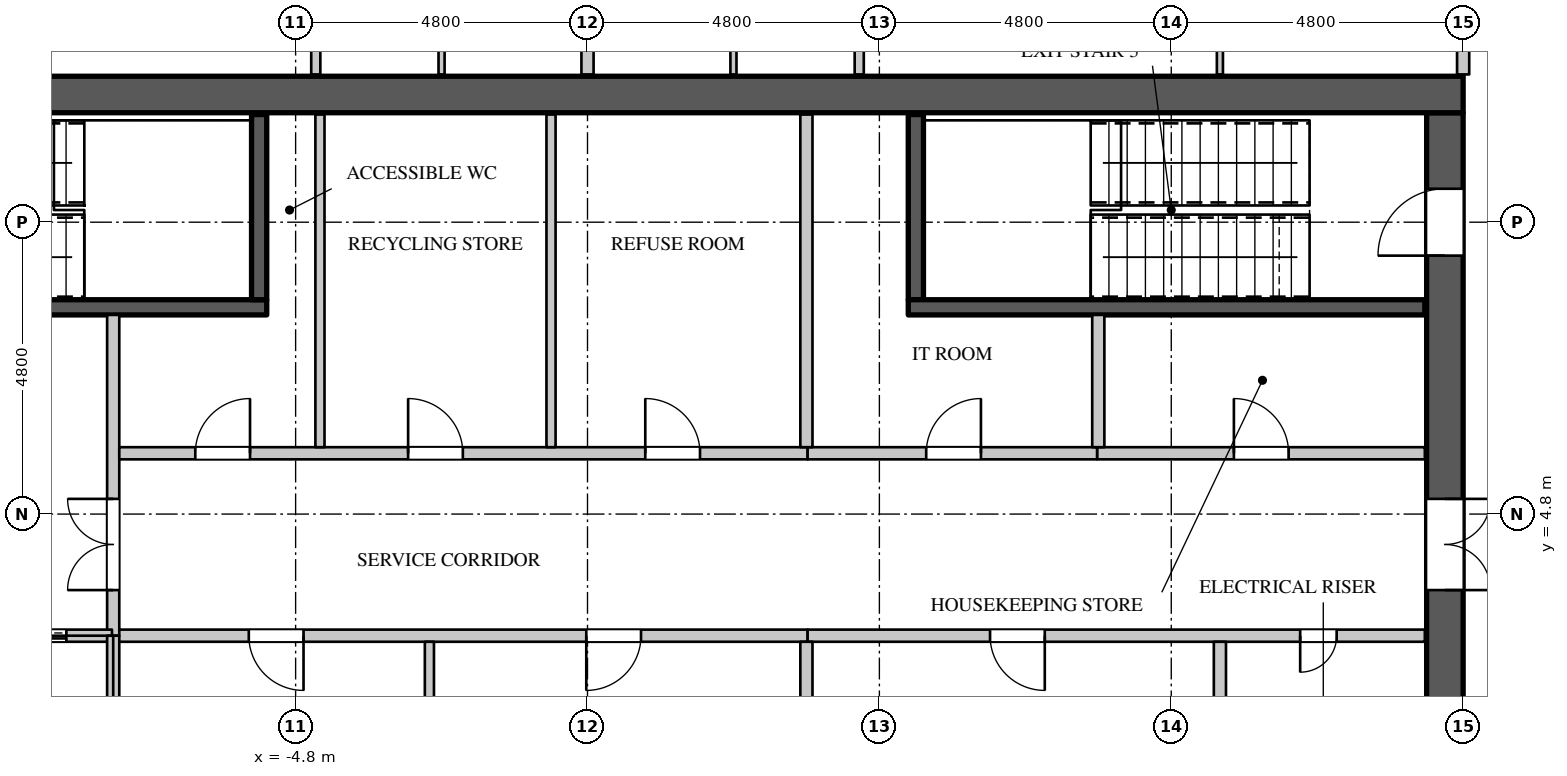
"""IFC4 building model, lengths in metres.
Left out: names, types, materials, properties, quantities, classifications, styles, units other than length and angle.
Written with IfcOpenShell. Run it as: python <this file> out.ifc"""

import sys

from ifc_helpers import new_model, si_unit, direction, frame, frame_2d, origin, place, context, subcontext, project, spatial, rectangle, extrude, element, fill, save


model = new_model("IFC4")
c1 = context("Model", 3, precision=1e-05, world=origin(), true_north=direction((0.0, 1.0)))
c2 = subcontext(c1, "Body", "Model", "MODEL_VIEW")
j1 = project(units=[si_unit("LENGTHUNIT", "METRE"), si_unit("PLANEANGLEUNIT", "RADIAN")], contexts=[c1])
p1 = place(None, origin())
s1 = spatial("IfcSite", under=j1, at=p1, CompositionType="ELEMENT")
p2 = place(p1, origin())
s2 = spatial("IfcBuilding", under=s1, at=p2, CompositionType="ELEMENT")
p3 = place(p2, frame((0.0, 0.0, 247.5)))
s3 = spatial("IfcBuildingStorey", under=s2, at=p3, CompositionType="ELEMENT", Elevation=247.5)
p4 = place(p3, frame((-14.4, 11.7, 0.0), z_axis=(0.0, 0.0, 1.0), x_axis=(1.0, 0.0, 0.0)))
e1 = element("IfcWall", 1, at=p4, inside=s3, PredefinedType="SHEAR", context=c2, shape_type="SweptSolid", body=[
    extrude(rectangle(XDim=28.8, YDim=0.6, at=frame_2d((14.4, 0.0))), origin(), (0.0, 0.0, 1.0), 4.2),
])
p5 = place(p3, frame((14.1, -11.4, 0.0), z_axis=(0.0, 0.0, 1.0), x_axis=(0.0, 1.0, 0.0)))
e2 = element("IfcWall", 2, at=p5, inside=s3, PredefinedType="SHEAR", context=c2, shape_type="SweptSolid", body=[
    extrude(rectangle(XDim=22.8, YDim=0.6, at=frame_2d((11.4, 0.0))), origin(), (0.0, 0.0, 1.0), 4.2),
])
p6 = place(p5, frame((20.45, 0.0, 0.0)))
e3 = element("IfcOpeningElement", 3, at=p6, cuts=e2, PredefinedType="OPENING", context=c2, shape_type="SweptSolid", body=[
    extrude(rectangle(XDim=1.1, YDim=2.2, at=frame_2d((0.55, 1.1))), frame((0.0, 0.31, 0.0), z_axis=(0.0, -1.0, 0.0), x_axis=(1.0, 0.0, 0.0)), (0.0, 0.0, 1.0), 0.62),
])
p7 = place(p5, frame((1.25, 0.0, 0.0)))
e4 = element("IfcOpeningElement", 4, at=p7, cuts=e2, PredefinedType="OPENING", context=c2, shape_type="SweptSolid", body=[
    extrude(rectangle(XDim=1.1, YDim=2.2, at=frame_2d((0.55, 1.1))), frame((0.0, 0.31, 0.0), z_axis=(0.0, -1.0, 0.0), x_axis=(1.0, 0.0, 0.0)), (0.0, 0.0, 1.0), 0.62),
])
p8 = place(p5, frame((14.95, 0.0, 0.0)))
e5 = element("IfcOpeningElement", 5, at=p8, cuts=e2, PredefinedType="OPENING", context=c2, shape_type="SweptSolid", body=[
    extrude(rectangle(XDim=1.5, YDim=2.4, at=frame_2d((0.75, 1.2))), frame((0.0, 0.31, 0.0), z_axis=(0.0, -1.0, 0.0), x_axis=(1.0, 0.0, 0.0)), (0.0, 0.0, 1.0), 0.62),
])
p9 = place(p5, frame((6.35, 0.0, 0.0)))
e6 = element("IfcOpeningElement", 6, at=p9, cuts=e2, PredefinedType="OPENING", context=c2, shape_type="SweptSolid", body=[
    extrude(rectangle(XDim=1.5, YDim=2.4, at=frame_2d((0.75, 1.2))), frame((0.0, 0.31, 0.0), z_axis=(0.0, -1.0, 0.0), x_axis=(1.0, 0.0, 0.0)), (0.0, 0.0, 1.0), 0.62),
])
p10 = place(p3, frame((-7.82, 2.8, 0.0), z_axis=(0.0, 0.0, 1.0), x_axis=(1.0, 0.0, 0.0)))
e7 = element("IfcWall", 7, at=p10, inside=s3, PredefinedType="PARTITIONING", context=c2, shape_type="SweptSolid", body=[
    extrude(rectangle(XDim=11.44, YDim=0.2, at=frame_2d((5.72, 0.0))), origin(), (0.0, 0.0, 1.0), 3.95),
])
p11 = place(p10, frame((2.25, 0.0, 0.0)))
e8 = element("IfcOpeningElement", 8, at=p11, cuts=e7, PredefinedType="OPENING", context=c2, shape_type="SweptSolid", body=[
    extrude(rectangle(XDim=0.9, YDim=2.2, at=frame_2d((0.45, 1.1))), frame((0.0, 0.11, 0.0), z_axis=(0.0, -1.0, 0.0), x_axis=(1.0, 0.0, 0.0)), (0.0, 0.0, 1.0), 0.22),
])
p12 = place(p10, frame((7.8, 0.0, 0.0)))
e9 = element("IfcOpeningElement", 9, at=p12, cuts=e7, PredefinedType="OPENING", context=c2, shape_type="SweptSolid", body=[
    extrude(rectangle(XDim=0.9, YDim=2.2, at=frame_2d((0.45, 1.1))), frame((0.0, 0.11, 0.0), z_axis=(0.0, -1.0, 0.0), x_axis=(1.0, 0.0, 0.0)), (0.0, 0.0, 1.0), 0.22),
])
p13 = place(p3, frame((-7.8, 2.8, 0.0), z_axis=(0.0, 0.0, 1.0), x_axis=(0.0, 1.0, 0.0)))
e10 = element("IfcWall", 10, at=p13, inside=s3, PredefinedType="PARTITIONING", context=c2, shape_type="SweptSolid", body=[
    extrude(rectangle(XDim=5.275, YDim=0.2, at=frame_2d((2.637, 0.0))), origin(), (0.0, 0.0, 1.0), 3.95),
])
p14 = place(p13, frame((0.75, 0.0, 0.0)))
e11 = element("IfcOpeningElement", 11, at=p14, cuts=e10, PredefinedType="OPENING", context=c2, shape_type="SweptSolid", body=[
    extrude(rectangle(XDim=1.5, YDim=2.4, at=frame_2d((0.75, 1.2))), frame((0.0, 0.11, 0.0), z_axis=(0.0, -1.0, 0.0), x_axis=(1.0, 0.0, 0.0)), (0.0, 0.0, 1.0), 0.22),
])
p15 = place(p3, frame((-7.7, 5.8, 0.0), z_axis=(0.0, 0.0, 1.0), x_axis=(1.0, 0.0, 0.0)))
e12 = element("IfcWall", 12, at=p15, inside=s3, PredefinedType="PARTITIONING", context=c2, shape_type="SweptSolid", body=[
    extrude(rectangle(XDim=11.32, YDim=0.2, at=frame_2d((5.66, 0.0))), origin(), (0.0, 0.0, 1.0), 3.95),
])
p16 = place(p15, frame((1.25, 0.0, 0.0)))
e13 = element("IfcOpeningElement", 13, at=p16, cuts=e12, PredefinedType="OPENING", context=c2, shape_type="SweptSolid", body=[
    extrude(rectangle(XDim=0.9, YDim=2.2, at=frame_2d((0.45, 1.1))), frame((0.0, 0.11, 0.0), z_axis=(0.0, -1.0, 0.0), x_axis=(1.0, 0.0, 0.0)), (0.0, 0.0, 1.0), 0.22),
])
p17 = place(p15, frame((4.75, 0.0, 0.0)))
e14 = element("IfcOpeningElement", 14, at=p17, cuts=e12, PredefinedType="OPENING", context=c2, shape_type="SweptSolid", body=[
    extrude(rectangle(XDim=0.9, YDim=2.2, at=frame_2d((0.45, 1.1))), frame((0.0, 0.11, 0.0), z_axis=(0.0, -1.0, 0.0), x_axis=(1.0, 0.0, 0.0)), (0.0, 0.0, 1.0), 0.22),
])
p18 = place(p15, frame((8.65, 0.0, 0.0)))
e15 = element("IfcOpeningElement", 15, at=p18, cuts=e12, PredefinedType="OPENING", context=c2, shape_type="SweptSolid", body=[
    extrude(rectangle(XDim=0.9, YDim=2.2, at=frame_2d((0.45, 1.1))), frame((0.0, 0.11, 0.0), z_axis=(0.0, -1.0, 0.0), x_axis=(1.0, 0.0, 0.0)), (0.0, 0.0, 1.0), 0.22),
])
p19 = place(p3, frame((8.38, 5.8, 0.0), z_axis=(0.0, 0.0, 1.0), x_axis=(1.0, 0.0, 0.0)))
e16 = element("IfcWall", 16, at=p19, inside=s3, PredefinedType="PARTITIONING", context=c2, shape_type="SweptSolid", body=[
    extrude(rectangle(XDim=5.39, YDim=0.2, at=frame_2d((2.695, 0.0))), origin(), (0.0, 0.0, 1.0), 3.95),
])
p20 = place(p19, frame((2.25, 0.0, 0.0)))
e17 = element("IfcOpeningElement", 17, at=p20, cuts=e16, PredefinedType="OPENING", context=c2, shape_type="SweptSolid", body=[
    extrude(rectangle(XDim=0.9, YDim=2.2, at=frame_2d((0.45, 1.1))), frame((0.0, 0.11, 0.0), z_axis=(0.0, -1.0, 0.0), x_axis=(1.0, 0.0, 0.0)), (0.0, 0.0, 1.0), 0.22),
])
p21 = place(p3, frame((14.4, 12.03, 0.0), z_axis=(0.0, 0.0, 1.0), x_axis=(0.0, 1.0, 0.0)))
e18 = element("IfcWall", 18, at=p21, inside=s3, PredefinedType="PARTITIONING", context=c2, shape_type="SweptSolid", body=[
    extrude(rectangle(XDim=2.27, YDim=0.2, at=frame_2d((1.135, 0.0))), origin(), (0.0, 0.0, 1.0), 3.95),
])
p22 = place(p3, frame((-4.469, 12.03, 0.0), z_axis=(0.0, 0.0, 1.0), x_axis=(0.0, 1.0, 0.0)))
e19 = element("IfcWall", 19, at=p22, inside=s3, PredefinedType="PARTITIONING", context=c2, shape_type="SweptSolid", body=[
    extrude(rectangle(XDim=13.92, YDim=0.15, at=frame_2d((6.96, 0.0))), origin(), (0.0, 0.0, 1.0), 3.3),
])
p23 = place(p22, frame((9.1, 0.0, 0.0)))
e20 = element("IfcOpeningElement", 20, at=p23, cuts=e19, PredefinedType="OPENING", context=c2, shape_type="SweptSolid", body=[
    extrude(rectangle(XDim=0.95, YDim=2.2, at=frame_2d((0.475, 1.1))), frame((0.0, 0.085, 0.0), z_axis=(0.0, -1.0, 0.0), x_axis=(1.0, 0.0, 0.0)), (0.0, 0.0, 1.0), 0.17),
])
p24 = place(p3, frame((-4.4, 5.9, 0.0), z_axis=(0.0, 0.0, 1.0), x_axis=(0.0, 1.0, 0.0)))
e21 = element("IfcWall", 21, at=p24, inside=s3, PredefinedType="PARTITIONING", context=c2, shape_type="SweptSolid", body=[
    extrude(rectangle(XDim=5.47, YDim=0.15, at=frame_2d((2.735, 0.0))), origin(), (0.0, 0.0, 1.0), 3.95),
])
p25 = place(p3, frame((-2.6, 0.0, 0.0), z_axis=(0.0, 0.0, 1.0), x_axis=(0.0, 1.0, 0.0)))
e22 = element("IfcWall", 22, at=p25, inside=s3, PredefinedType="PARTITIONING", context=c2, shape_type="SweptSolid", body=[
    extrude(rectangle(XDim=2.7, YDim=0.15, at=frame_2d((1.35, 0.0))), origin(), (0.0, 0.0, 1.0), 3.95),
])
p26 = place(p3, frame((-0.6, 5.9, 0.0), z_axis=(0.0, 0.0, 1.0), x_axis=(0.0, 1.0, 0.0)))
e23 = element("IfcWall", 23, at=p26, inside=s3, PredefinedType="PARTITIONING", context=c2, shape_type="SweptSolid", body=[
    extrude(rectangle(XDim=5.47, YDim=0.15, at=frame_2d((2.735, 0.0))), origin(), (0.0, 0.0, 1.0), 3.95),
])
p27 = place(p3, frame((4.469, 12.03, 0.0), z_axis=(0.0, 0.0, 1.0), x_axis=(0.0, 1.0, 0.0)))
e24 = element("IfcWall", 24, at=p27, inside=s3, PredefinedType="PARTITIONING", context=c2, shape_type="SweptSolid", body=[
    extrude(rectangle(XDim=13.92, YDim=0.15, at=frame_2d((6.96, 0.0))), origin(), (0.0, 0.0, 1.0), 3.3),
])
p28 = place(p27, frame((9.35, 0.0, 0.0)))
e25 = element("IfcOpeningElement", 25, at=p28, cuts=e24, PredefinedType="OPENING", context=c2, shape_type="SweptSolid", body=[
    extrude(rectangle(XDim=0.95, YDim=2.2, at=frame_2d((0.475, 1.1))), frame((0.0, 0.085, 0.0), z_axis=(0.0, -1.0, 0.0), x_axis=(1.0, 0.0, 0.0)), (0.0, 0.0, 1.0), 0.17),
])
p29 = place(p3, frame((0.0, 12.03, 0.0), z_axis=(0.0, 0.0, 1.0), x_axis=(0.0, 1.0, 0.0)))
e26 = element("IfcWall", 26, at=p29, inside=s3, PredefinedType="PARTITIONING", context=c2, shape_type="SweptSolid", body=[
    extrude(rectangle(XDim=14.425, YDim=0.2, at=frame_2d((7.212, 0.0))), origin(), (0.0, 0.0, 1.0), 3.95),
])
p30 = place(p3, frame((3.62, 2.8, 0.0), z_axis=(0.0, 0.0, 1.0), x_axis=(1.0, 0.0, 0.0)))
e27 = element("IfcWall", 27, at=p30, inside=s3, PredefinedType="PARTITIONING", context=c2, shape_type="SweptSolid", body=[
    extrude(rectangle(XDim=10.15, YDim=0.2, at=frame_2d((5.075, 0.0))), origin(), (0.0, 0.0, 1.0), 3.95),
])
p31 = place(p30, frame((8.1, 0.0, 0.0)))
e28 = element("IfcOpeningElement", 28, at=p31, cuts=e27, PredefinedType="OPENING", context=c2, shape_type="SweptSolid", body=[
    extrude(rectangle(XDim=0.6, YDim=2.0, at=frame_2d((0.3, 1.0))), frame((0.0, 0.11, 0.0), z_axis=(0.0, -1.0, 0.0), x_axis=(1.0, 0.0, 0.0)), (0.0, 0.0, 1.0), 0.22),
])
p32 = place(p30, frame((3.0, 0.0, 0.0)))
e29 = element("IfcOpeningElement", 29, at=p32, cuts=e27, PredefinedType="OPENING", context=c2, shape_type="SweptSolid", body=[
    extrude(rectangle(XDim=0.9, YDim=2.2, at=frame_2d((0.45, 1.1))), frame((0.0, 0.11, 0.0), z_axis=(0.0, -1.0, 0.0), x_axis=(1.0, 0.0, 0.0)), (0.0, 0.0, 1.0), 0.22),
])
p33 = place(p3, frame((3.62, 5.8, 0.0), z_axis=(0.0, 0.0, 1.0), x_axis=(1.0, 0.0, 0.0)))
e30 = element("IfcWall", 30, at=p33, inside=s3, PredefinedType="PARTITIONING", context=c2, shape_type="SweptSolid", body=[
    extrude(rectangle(XDim=4.76, YDim=0.2, at=frame_2d((2.38, 0.0))), origin(), (0.0, 0.0, 1.0), 3.95),
])
p34 = place(p33, frame((1.95, 0.0, 0.0)))
e31 = element("IfcOpeningElement", 31, at=p34, cuts=e30, PredefinedType="OPENING", context=c2, shape_type="SweptSolid", body=[
    extrude(rectangle(XDim=0.9, YDim=2.2, at=frame_2d((0.45, 1.1))), frame((0.0, 0.11, 0.0), z_axis=(0.0, -1.0, 0.0), x_axis=(1.0, 0.0, 0.0)), (0.0, 0.0, 1.0), 0.22),
])
p35 = place(p3, frame((3.6, 0.1, 0.0), z_axis=(0.0, 0.0, 1.0), x_axis=(0.0, 1.0, 0.0)))
e32 = element("IfcWall", 32, at=p35, inside=s3, PredefinedType="PARTITIONING", context=c2, shape_type="SweptSolid", body=[
    extrude(rectangle(XDim=2.6, YDim=0.2, at=frame_2d((1.3, 0.0))), origin(), (0.0, 0.0, 1.0), 3.95),
])
p36 = place(p3, frame((3.6, 5.9, 0.0), z_axis=(0.0, 0.0, 1.0), x_axis=(0.0, 1.0, 0.0)))
e33 = element("IfcWall", 33, at=p36, inside=s3, PredefinedType="PARTITIONING", context=c2, shape_type="SweptSolid", body=[
    extrude(rectangle(XDim=5.47, YDim=0.2, at=frame_2d((2.735, 0.0))), origin(), (0.0, 0.0, 1.0), 3.95),
])
p37 = place(p3, frame((8.4, 5.9, 0.0), z_axis=(0.0, 0.0, 1.0), x_axis=(0.0, 1.0, 0.0)))
e34 = element("IfcWall", 34, at=p37, inside=s3, PredefinedType="PARTITIONING", context=c2, shape_type="SweptSolid", body=[
    extrude(rectangle(XDim=2.175, YDim=0.2, at=frame_2d((1.087, 0.0))), origin(), (0.0, 0.0, 1.0), 3.95),
])
p38 = place(p3, frame((10.4, 0.1, 0.0), z_axis=(0.0, 0.0, 1.0), x_axis=(0.0, 1.0, 0.0)))
e35 = element("IfcWall", 35, at=p38, inside=s3, PredefinedType="PARTITIONING", context=c2, shape_type="SweptSolid", body=[
    extrude(rectangle(XDim=2.6, YDim=0.2, at=frame_2d((1.3, 0.0))), origin(), (0.0, 0.0, 1.0), 3.95),
])
p39 = place(p3, frame((-13.77, 2.8, 0.0), z_axis=(0.0, 0.0, 1.0), x_axis=(1.0, 0.0, 0.0)))
e36 = element("IfcWall", 36, at=p39, inside=s3, PredefinedType="PARTITIONING", context=c2, shape_type="SweptSolid", body=[
    extrude(rectangle(XDim=5.95, YDim=0.2, at=frame_2d((2.975, 0.0))), origin(), (0.0, 0.0, 1.0), 3.95),
])
p40 = place(p39, frame((1.1, 0.0, 0.0)))
e37 = element("IfcOpeningElement", 37, at=p40, cuts=e36, PredefinedType="OPENING", context=c2, shape_type="SweptSolid", body=[
    extrude(rectangle(XDim=1.1, YDim=2.2, at=frame_2d((0.55, 1.1))), frame((0.0, 0.11, 0.0), z_axis=(0.0, -1.0, 0.0), x_axis=(1.0, 0.0, 0.0)), (0.0, 0.0, 1.0), 0.22),
])
p41 = place(p39, frame((4.1, 0.0, 0.0)))
e38 = element("IfcOpeningElement", 38, at=p41, cuts=e36, PredefinedType="OPENING", context=c2, shape_type="SweptSolid", body=[
    extrude(rectangle(XDim=1.1, YDim=2.2, at=frame_2d((0.55, 1.1))), frame((0.0, 0.11, 0.0), z_axis=(0.0, -1.0, 0.0), x_axis=(1.0, 0.0, 0.0)), (0.0, 0.0, 1.0), 0.22),
])
p42 = place(p3, frame((-7.8, 0.0, 0.0), z_axis=(0.0, 0.0, 1.0), x_axis=(0.0, 1.0, 0.0)))
e39 = element("IfcWall", 39, at=p42, inside=s3, PredefinedType="PARTITIONING", context=c2, shape_type="SweptSolid", body=[
    extrude(rectangle(XDim=2.8, YDim=0.2, at=frame_2d((1.4, 0.0))), origin(), (0.0, 0.0, 1.0), 3.95),
])
p43 = place(p3, frame((-13.77, 8.2, 0.0), z_axis=(0.0, 0.0, 1.0), x_axis=(1.0, 0.0, 0.0)))
e40 = element("IfcWall", 40, at=p43, inside=s3, PredefinedType="SHEAR", context=c2, shape_type="SweptSolid", body=[
    extrude(rectangle(XDim=8.495, YDim=0.25, at=frame_2d((4.248, 0.0))), origin(), (0.0, 0.0, 1.0), 3.95),
])
p44 = place(p43, frame((0.15, 0.0, 0.0)))
e41 = element("IfcOpeningElement", 41, at=p44, cuts=e40, PredefinedType="OPENING", context=c2, shape_type="SweptSolid", body=[
    extrude(rectangle(XDim=1.1, YDim=2.2, at=frame_2d((0.55, 1.1))), frame((0.0, 0.135, 0.0), z_axis=(0.0, -1.0, 0.0), x_axis=(1.0, 0.0, 0.0)), (0.0, 0.0, 1.0), 0.27),
])
for number, where, z_axis, x_axis in (
    (42, (-5.4, 8.325, 0.0), (0.0, 0.0, 1.0), (0.0, 1.0, 0.0)),
    (43, (5.4, 8.325, 0.0), (0.0, 0.0, 1.0), (0.0, 1.0, 0.0)),
):
    element("IfcWall", number, at=place(p3, frame(where, z_axis=z_axis, x_axis=x_axis)), inside=s3, PredefinedType="SHEAR", context=c2, shape_type="SweptSolid", body=[
        extrude(rectangle(XDim=3.045, YDim=0.25, at=frame_2d((1.522, 0.0))), origin(), (0.0, 0.0, 1.0), 3.95),
    ])
p45 = place(p3, frame((5.275, 8.2, 0.0), z_axis=(0.0, 0.0, 1.0), x_axis=(1.0, 0.0, 0.0)))
e44 = element("IfcWall", 44, at=p45, inside=s3, PredefinedType="SHEAR", context=c2, shape_type="SweptSolid", body=[
    extrude(rectangle(XDim=8.495, YDim=0.25, at=frame_2d((4.248, 0.0))), origin(), (0.0, 0.0, 1.0), 3.95),
])
for number, where, z_axis, x_axis in (
    (45, (-2.4, 12.03, 0.0), (0.0, 0.0, 1.0), (0.0, 1.0, 0.0)),
    (46, (2.4, 12.03, 0.0), (0.0, 0.0, 1.0), (0.0, 1.0, 0.0)),
):
    element("IfcWall", number, at=place(p3, frame(where, z_axis=z_axis, x_axis=x_axis)), inside=s3, PredefinedType="PARTITIONING", context=c2, shape_type="SweptSolid", body=[
        extrude(rectangle(XDim=5.295, YDim=0.1, at=frame_2d((2.647, 0.0))), origin(), (0.0, 0.0, 1.0), 3.95),
    ])
p46 = place(p3, frame((10.4, 12.03, 0.0), z_axis=(0.0, 0.0, 1.0), x_axis=(0.0, 1.0, 0.0)))
e47 = element("IfcWall", 47, at=p46, inside=s3, PredefinedType="PARTITIONING", context=c2, shape_type="SweptSolid", body=[
    extrude(rectangle(XDim=5.795, YDim=0.1, at=frame_2d((2.897, 0.0))), origin(), (0.0, 0.0, 1.0), 3.95),
])
p47 = place(p46, frame((2.45, 0.0, 0.0)))
e48 = element("IfcOpeningElement", 48, at=p47, cuts=e47, PredefinedType="OPENING", context=c2, shape_type="SweptSolid", body=[
    extrude(rectangle(XDim=0.9, YDim=2.2, at=frame_2d((0.45, 1.1))), frame((0.0, 0.06, 0.0), z_axis=(0.0, -1.0, 0.0), x_axis=(1.0, 0.0, 0.0)), (0.0, 0.0, 1.0), 0.12),
])
p48 = place(p31, origin())
e49 = element("IfcDoor", 49, at=p48, inside=s3, OperationType="SINGLE_SWING_RIGHT", PredefinedType="DOOR", context=c2, shape_type="SweptSolid", body=[
    extrude(rectangle(XDim=0.6, YDim=2.0, at=frame_2d((0.3, 1.0))), frame((0.0, 0.025, 0.0), z_axis=(0.0, -1.0, 0.0), x_axis=(1.0, 0.0, 0.0)), (0.0, 0.0, 1.0), 0.05),
])
fill(e28, e49)
p49 = place(p16, origin())
e50 = element("IfcDoor", 50, at=p49, inside=s3, OperationType="SINGLE_SWING_RIGHT", PredefinedType="DOOR", context=c2, shape_type="SweptSolid", body=[
    extrude(rectangle(XDim=0.9, YDim=2.2, at=frame_2d((0.45, 1.1))), frame((0.0, 0.025, 0.0), z_axis=(0.0, -1.0, 0.0), x_axis=(1.0, 0.0, 0.0)), (0.0, 0.0, 1.0), 0.05),
])
fill(e13, e50)
p50 = place(p17, origin())
e51 = element("IfcDoor", 51, at=p50, inside=s3, OperationType="SINGLE_SWING_LEFT", PredefinedType="DOOR", context=c2, shape_type="SweptSolid", body=[
    extrude(rectangle(XDim=0.9, YDim=2.2, at=frame_2d((0.45, 1.1))), frame((0.0, 0.025, 0.0), z_axis=(0.0, -1.0, 0.0), x_axis=(1.0, 0.0, 0.0)), (0.0, 0.0, 1.0), 0.05),
])
fill(e14, e51)
p51 = place(p18, origin())
e52 = element("IfcDoor", 52, at=p51, inside=s3, OperationType="SINGLE_SWING_LEFT", PredefinedType="DOOR", context=c2, shape_type="SweptSolid", body=[
    extrude(rectangle(XDim=0.9, YDim=2.2, at=frame_2d((0.45, 1.1))), frame((0.0, 0.025, 0.0), z_axis=(0.0, -1.0, 0.0), x_axis=(1.0, 0.0, 0.0)), (0.0, 0.0, 1.0), 0.05),
])
fill(e15, e52)
p52 = place(p34, origin())
e53 = element("IfcDoor", 53, at=p52, inside=s3, OperationType="SINGLE_SWING_RIGHT", PredefinedType="DOOR", context=c2, shape_type="SweptSolid", body=[
    extrude(rectangle(XDim=0.9, YDim=2.2, at=frame_2d((0.45, 1.1))), frame((0.0, 0.025, 0.0), z_axis=(0.0, -1.0, 0.0), x_axis=(1.0, 0.0, 0.0)), (0.0, 0.0, 1.0), 0.05),
])
fill(e31, e53)
p53 = place(p20, origin())
e54 = element("IfcDoor", 54, at=p53, inside=s3, OperationType="SINGLE_SWING_LEFT", PredefinedType="DOOR", context=c2, shape_type="SweptSolid", body=[
    extrude(rectangle(XDim=0.9, YDim=2.2, at=frame_2d((0.45, 1.1))), frame((0.0, 0.025, 0.0), z_axis=(0.0, -1.0, 0.0), x_axis=(1.0, 0.0, 0.0)), (0.0, 0.0, 1.0), 0.05),
])
fill(e17, e54)
p54 = place(p11, origin())
e55 = element("IfcDoor", 55, at=p54, inside=s3, OperationType="SINGLE_SWING_LEFT", PredefinedType="DOOR", context=c2, shape_type="SweptSolid", body=[
    extrude(rectangle(XDim=0.9, YDim=2.2, at=frame_2d((0.45, 1.1))), frame((0.0, 0.025, 0.0), z_axis=(0.0, -1.0, 0.0), x_axis=(1.0, 0.0, 0.0)), (0.0, 0.0, 1.0), 0.05),
])
fill(e8, e55)
p55 = place(p12, origin())
e56 = element("IfcDoor", 56, at=p55, inside=s3, OperationType="SINGLE_SWING_RIGHT", PredefinedType="DOOR", context=c2, shape_type="SweptSolid", body=[
    extrude(rectangle(XDim=0.9, YDim=2.2, at=frame_2d((0.45, 1.1))), frame((0.0, 0.025, 0.0), z_axis=(0.0, -1.0, 0.0), x_axis=(1.0, 0.0, 0.0)), (0.0, 0.0, 1.0), 0.05),
])
fill(e9, e56)
p56 = place(p32, origin())
e57 = element("IfcDoor", 57, at=p56, inside=s3, OperationType="SINGLE_SWING_LEFT", PredefinedType="DOOR", context=c2, shape_type="SweptSolid", body=[
    extrude(rectangle(XDim=0.9, YDim=2.2, at=frame_2d((0.45, 1.1))), frame((0.0, 0.025, 0.0), z_axis=(0.0, -1.0, 0.0), x_axis=(1.0, 0.0, 0.0)), (0.0, 0.0, 1.0), 0.05),
])
fill(e29, e57)
p57 = place(p41, origin())
e58 = element("IfcDoor", 58, at=p57, inside=s3, OperationType="DOUBLE_DOOR_SLIDING", PredefinedType="DOOR", context=c2, shape_type="SweptSolid", body=[
    extrude(rectangle(XDim=1.1, YDim=2.2, at=frame_2d((0.55, 1.1))), frame((0.0, 0.025, 0.0), z_axis=(0.0, -1.0, 0.0), x_axis=(1.0, 0.0, 0.0)), (0.0, 0.0, 1.0), 0.05),
])
fill(e38, e58)
p58 = place(p14, origin())
e59 = element("IfcDoor", 59, at=p58, inside=s3, OperationType="DOUBLE_DOOR_SINGLE_SWING", PredefinedType="DOOR", context=c2, shape_type="SweptSolid", body=[
    extrude(rectangle(XDim=1.5, YDim=2.4, at=frame_2d((0.75, 1.2))), frame((0.0, 0.025, 0.0), z_axis=(0.0, -1.0, 0.0), x_axis=(1.0, 0.0, 0.0)), (0.0, 0.0, 1.0), 0.05),
])
fill(e11, e59)
p59 = place(p6, origin())
e60 = element("IfcDoor", 60, at=p59, inside=s3, OperationType="SINGLE_SWING_LEFT", PredefinedType="DOOR", context=c2, shape_type="SweptSolid", body=[
    extrude(rectangle(XDim=1.1, YDim=2.2, at=frame_2d((0.55, 1.1))), frame((0.0, 0.295, 0.0), z_axis=(0.0, -1.0, 0.0), x_axis=(1.0, 0.0, 0.0)), (0.0, 0.0, 1.0), 0.05),
])
fill(e3, e60)
p60 = place(p8, origin())
e61 = element("IfcDoor", 61, at=p60, inside=s3, OperationType="DOUBLE_DOOR_SINGLE_SWING", PredefinedType="DOOR", context=c2, shape_type="SweptSolid", body=[
    extrude(rectangle(XDim=1.5, YDim=2.4, at=frame_2d((0.75, 1.2))), frame((0.0, -0.245, 0.0), z_axis=(0.0, -1.0, 0.0), x_axis=(1.0, 0.0, 0.0)), (0.0, 0.0, 1.0), 0.05),
])
fill(e5, e61)
save(model, sys.argv[1])
